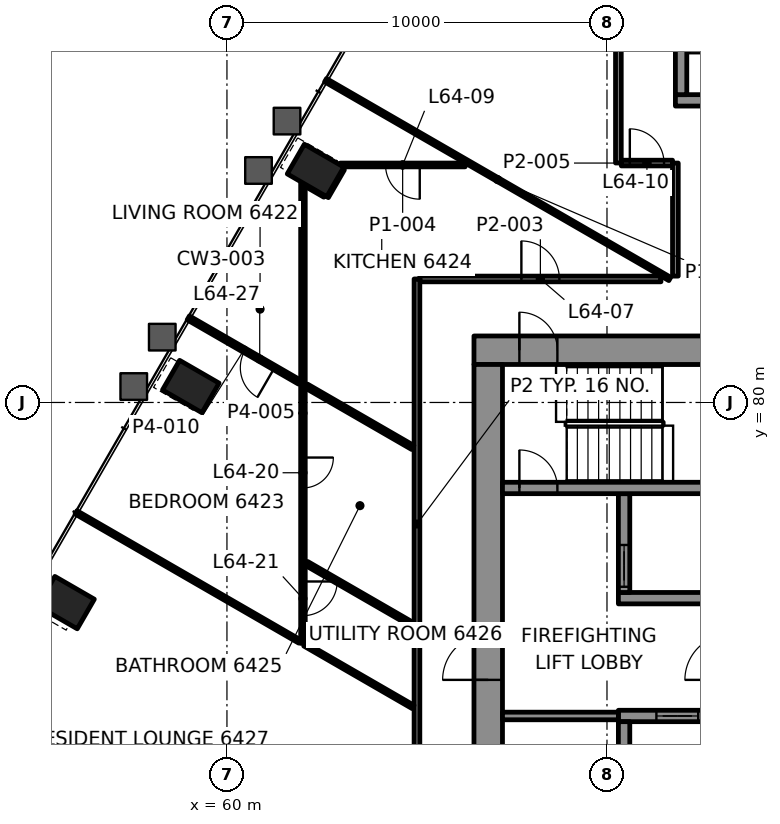
"""IFC4 building model, lengths in metres.
Left out: names, types, materials, properties, quantities, classifications, styles, units other than length and angle.
Written with IfcOpenShell. Run it as: python <this file> out.ifc"""

import sys

from ifc_helpers import new_model, si_unit, direction, frame, frame_2d, origin, origin_2d, place, context, subcontext, project, spatial, rectangle, hollow_rectangle, extrude, element, fill, save


model = new_model("IFC4")
c1 = context("Model", 3, precision=1e-05, world=origin(), true_north=direction((0.0, 1.0)))
c2 = subcontext(c1, "Body", "Model", "MODEL_VIEW")
j1 = project(units=[si_unit("LENGTHUNIT", "METRE"), si_unit("PLANEANGLEUNIT", "RADIAN")], contexts=[c1])
p1 = place(None, origin())
s1 = spatial("IfcSite", under=j1, at=p1, CompositionType="ELEMENT")
p2 = place(p1, origin())
s2 = spatial("IfcBuilding", under=s1, at=p2, CompositionType="ELEMENT")
p3 = place(p2, frame((0.0, 0.0, 270.6)))
s3 = spatial("IfcBuildingStorey", under=s2, at=p3, CompositionType="ELEMENT", Elevation=270.6)
for number, where, z_axis, x_axis in (
    (1, (62.332, 86.105, -0.0), (0.0, 0.0, 1.0), (-0.5, -0.866, 0.0)),
    (2, (59.049, 80.419, -0.0), (0.0, 0.0, 1.0), (-0.5, -0.866, 0.0)),
    (3, (55.766, 74.733, -0.0), (0.0, 0.0, 1.0), (-0.5, -0.866, 0.0)),
):
    element("IfcColumn", number, at=place(p3, frame(where, z_axis=z_axis, x_axis=x_axis)), inside=s3, PredefinedType="COLUMN", context=c2, shape_type="SweptSolid", body=[
        extrude(hollow_rectangle(XDim=0.9, YDim=1.2, WallThickness=0.06, at=origin_2d()), origin(), (0.0, 0.0, 1.0), 3.5),
    ])
p4 = place(p3, frame((66.5, 81.375, 0.0), z_axis=(0.0, 0.0, 1.0), x_axis=(1.0, 0.0, 0.0)))
e4 = element("IfcWall", 4, at=p4, inside=s3, PredefinedType="SHEAR", context=c2, shape_type="SweptSolid", body=[
    extrude(rectangle(XDim=17.0, YDim=0.75, at=frame_2d((8.5, 0.0))), origin(), (0.0, 0.0, 1.0), 3.3),
])
p5 = place(p4, frame((1.195, 0.0, 0.0)))
e5 = element("IfcOpeningElement", 5, at=p5, cuts=e4, PredefinedType="OPENING", context=c2, shape_type="SweptSolid", body=[
    extrude(rectangle(XDim=1.0, YDim=2.1, at=frame_2d((0.5, 1.05))), frame((0.0, 0.385, 0.0), z_axis=(0.0, -1.0, 0.0), x_axis=(1.0, 0.0, 0.0)), (0.0, 0.0, 1.0), 0.77),
])
p6 = place(p4, frame((15.005, 0.0, 0.0)))
e6 = element("IfcOpeningElement", 6, at=p6, cuts=e4, PredefinedType="OPENING", context=c2, shape_type="SweptSolid", body=[
    extrude(rectangle(XDim=1.0, YDim=2.1, at=frame_2d((0.5, 1.05))), frame((0.0, 0.385, 0.0), z_axis=(0.0, -1.0, 0.0), x_axis=(1.0, 0.0, 0.0)), (0.0, 0.0, 1.0), 0.77),
])
p7 = place(p4, frame((8.15, 0.0, 0.0)))
e7 = element("IfcOpeningElement", 7, at=p7, cuts=e4, PredefinedType="OPENING", context=c2, shape_type="SweptSolid", body=[
    extrude(rectangle(XDim=0.9, YDim=2.1, at=frame_2d((0.45, 1.05))), frame((0.0, 0.385, 0.0), z_axis=(0.0, -1.0, 0.0), x_axis=(1.0, 0.0, 0.0)), (0.0, 0.0, 1.0), 0.77),
])
p8 = place(p3, frame((66.875, 69.0, 0.0), z_axis=(0.0, 0.0, 1.0), x_axis=(0.0, 1.0, 0.0)))
e8 = element("IfcWall", 8, at=p8, inside=s3, PredefinedType="SHEAR", context=c2, shape_type="SweptSolid", body=[
    extrude(rectangle(XDim=12.0, YDim=0.75, at=frame_2d((6.0, 0.0))), origin(), (0.0, 0.0, 1.0), 3.3),
])
p9 = place(p8, frame((3.7, 0.0, 0.0)))
e9 = element("IfcOpeningElement", 9, at=p9, cuts=e8, PredefinedType="OPENING", context=c2, shape_type="SweptSolid", body=[
    extrude(rectangle(XDim=1.2, YDim=2.1, at=frame_2d((0.6, 1.05))), frame((0.0, 0.385, 0.0), z_axis=(0.0, -1.0, 0.0), x_axis=(1.0, 0.0, 0.0)), (0.0, 0.0, 1.0), 0.77),
])
p10 = place(p3, frame((70.3, 71.75, 0.0), z_axis=(0.0, 0.0, 1.0), x_axis=(1.0, 0.0, 0.0)))
e10 = element("IfcWall", 10, at=p10, inside=s3, PredefinedType="SHEAR", context=c2, shape_type="SweptSolid", body=[
    extrude(rectangle(XDim=11.5, YDim=0.3, at=frame_2d((5.75, 0.0))), origin(), (0.0, 0.0, 1.0), 3.3),
])
p11 = place(p10, frame((1.0, 0.0, 0.0)))
e11 = element("IfcOpeningElement", 11, at=p11, cuts=e10, PredefinedType="OPENING", context=c2, shape_type="SweptSolid", body=[
    extrude(rectangle(XDim=1.1, YDim=2.1, at=frame_2d((0.55, 1.05))), frame((0.0, 0.16, 0.0), z_axis=(0.0, -1.0, 0.0), x_axis=(1.0, 0.0, 0.0)), (0.0, 0.0, 1.0), 0.32),
])
p12 = place(p10, frame((3.8, 0.0, 0.0)))
e12 = element("IfcOpeningElement", 12, at=p12, cuts=e10, PredefinedType="OPENING", context=c2, shape_type="SweptSolid", body=[
    extrude(rectangle(XDim=1.1, YDim=2.1, at=frame_2d((0.55, 1.05))), frame((0.0, 0.16, 0.0), z_axis=(0.0, -1.0, 0.0), x_axis=(1.0, 0.0, 0.0)), (0.0, 0.0, 1.0), 0.32),
])
p13 = place(p10, frame((6.6, 0.0, 0.0)))
e13 = element("IfcOpeningElement", 13, at=p13, cuts=e10, PredefinedType="OPENING", context=c2, shape_type="SweptSolid", body=[
    extrude(rectangle(XDim=1.1, YDim=2.1, at=frame_2d((0.55, 1.05))), frame((0.0, 0.16, 0.0), z_axis=(0.0, -1.0, 0.0), x_axis=(1.0, 0.0, 0.0)), (0.0, 0.0, 1.0), 0.32),
])
p14 = place(p10, frame((9.4, 0.0, 0.0)))
e14 = element("IfcOpeningElement", 14, at=p14, cuts=e10, PredefinedType="OPENING", context=c2, shape_type="SweptSolid", body=[
    extrude(rectangle(XDim=1.1, YDim=2.1, at=frame_2d((0.55, 1.05))), frame((0.0, 0.16, 0.0), z_axis=(0.0, -1.0, 0.0), x_axis=(1.0, 0.0, 0.0)), (0.0, 0.0, 1.0), 0.32),
])
p15 = place(p3, frame((70.3, 74.85, 0.0), z_axis=(0.0, 0.0, 1.0), x_axis=(1.0, 0.0, 0.0)))
e15 = element("IfcWall", 15, at=p15, inside=s3, PredefinedType="SHEAR", context=c2, shape_type="SweptSolid", body=[
    extrude(rectangle(XDim=5.9, YDim=0.3, at=frame_2d((2.95, 0.0))), origin(), (0.0, 0.0, 1.0), 3.3),
])
p16 = place(p15, frame((3.8, 0.0, 0.0)))
e16 = element("IfcOpeningElement", 16, at=p16, cuts=e15, PredefinedType="OPENING", context=c2, shape_type="SweptSolid", body=[
    extrude(rectangle(XDim=1.1, YDim=2.1, at=frame_2d((0.55, 1.05))), frame((0.0, 0.16, 0.0), z_axis=(0.0, -1.0, 0.0), x_axis=(1.0, 0.0, 0.0)), (0.0, 0.0, 1.0), 0.32),
])
p17 = place(p3, frame((70.45, 69.0, 0.0), z_axis=(0.0, 0.0, 1.0), x_axis=(0.0, 1.0, 0.0)))
e17 = element("IfcWall", 17, at=p17, inside=s3, PredefinedType="SHEAR", context=c2, shape_type="SweptSolid", body=[
    extrude(rectangle(XDim=2.6, YDim=0.3, at=frame_2d((1.3, 0.0))), origin(), (0.0, 0.0, 1.0), 3.3),
])
p18 = place(p3, frame((70.45, 75.0, 0.0), z_axis=(0.0, 0.0, 1.0), x_axis=(0.0, 1.0, 0.0)))
e18 = element("IfcWall", 18, at=p18, inside=s3, PredefinedType="SHEAR", context=c2, shape_type="SweptSolid", body=[
    extrude(rectangle(XDim=2.6, YDim=0.3, at=frame_2d((1.3, 0.0))), origin(), (0.0, 0.0, 1.0), 3.3),
])
p19 = place(p18, frame((0.15, 0.0, 0.0)))
e19 = element("IfcOpeningElement", 19, at=p19, cuts=e18, PredefinedType="OPENING", context=c2, shape_type="SweptSolid", body=[
    extrude(rectangle(XDim=1.1, YDim=2.1, at=frame_2d((0.55, 1.05))), frame((0.0, 0.16, 0.0), z_axis=(0.0, -1.0, 0.0), x_axis=(1.0, 0.0, 0.0)), (0.0, 0.0, 1.0), 0.32),
])
p20 = place(p3, frame((67.25, 77.75, 0.0), z_axis=(0.0, 0.0, 1.0), x_axis=(1.0, 0.0, 0.0)))
e20 = element("IfcWall", 20, at=p20, inside=s3, PredefinedType="SHEAR", context=c2, shape_type="SweptSolid", body=[
    extrude(rectangle(XDim=15.5, YDim=0.3, at=frame_2d((7.75, 0.0))), origin(), (0.0, 0.0, 1.0), 3.3),
])
p21 = place(p20, frame((0.445, 0.0, 0.0)))
e21 = element("IfcOpeningElement", 21, at=p21, cuts=e20, PredefinedType="OPENING", context=c2, shape_type="SweptSolid", body=[
    extrude(rectangle(XDim=1.0, YDim=2.1, at=frame_2d((0.5, 1.05))), frame((0.0, 0.16, 0.0), z_axis=(0.0, -1.0, 0.0), x_axis=(1.0, 0.0, 0.0)), (0.0, 0.0, 1.0), 0.32),
])
p22 = place(p3, frame((71.8, 87.95, 0.0), z_axis=(0.0, 0.0, 1.0), x_axis=(1.0, 0.0, 0.0)))
e22 = element("IfcWall", 22, at=p22, inside=s3, PredefinedType="SHEAR", context=c2, shape_type="SweptSolid", body=[
    extrude(rectangle(XDim=6.4, YDim=0.3, at=frame_2d((3.2, 0.0))), origin(), (0.0, 0.0, 1.0), 3.3),
])
p23 = place(p22, frame((1.325, 0.0, 0.0)))
e23 = element("IfcOpeningElement", 23, at=p23, cuts=e22, PredefinedType="OPENING", context=c2, shape_type="SweptSolid", body=[
    extrude(rectangle(XDim=1.0, YDim=2.1, at=frame_2d((0.5, 1.05))), frame((0.0, 0.16, 0.0), z_axis=(0.0, -1.0, 0.0), x_axis=(1.0, 0.0, 0.0)), (0.0, 0.0, 1.0), 0.32),
])
p24 = place(p22, frame((4.125, 0.0, 0.0)))
e24 = element("IfcOpeningElement", 24, at=p24, cuts=e22, PredefinedType="OPENING", context=c2, shape_type="SweptSolid", body=[
    extrude(rectangle(XDim=1.2, YDim=2.1, at=frame_2d((0.6, 1.05))), frame((0.0, 0.16, 0.0), z_axis=(0.0, -1.0, 0.0), x_axis=(1.0, 0.0, 0.0)), (0.0, 0.0, 1.0), 0.32),
])
p25 = place(p3, frame((71.95, 88.1, 0.0), z_axis=(0.0, 0.0, 1.0), x_axis=(0.0, 1.0, 0.0)))
e25 = element("IfcWall", 25, at=p25, inside=s3, PredefinedType="SHEAR", context=c2, shape_type="SweptSolid", body=[
    extrude(rectangle(XDim=6.2, YDim=0.3, at=frame_2d((3.1, 0.0))), origin(), (0.0, 0.0, 1.0), 3.3),
])
p26 = place(p3, frame((65.075, 83.25, 0.0), z_axis=(0.0, 0.0, 1.0), x_axis=(1.0, 0.0, 0.0)))
e26 = element("IfcWall", 26, at=p26, inside=s3, PredefinedType="PARTITIONING", context=c2, shape_type="SweptSolid", body=[
    extrude(rectangle(XDim=6.345, YDim=0.15, at=frame_2d((3.172, 0.0))), origin(), (0.0, 0.0, 1.0), 2.7),
])
p27 = place(p26, frame((2.672, 0.0, 0.0)))
e27 = element("IfcOpeningElement", 27, at=p27, cuts=e26, PredefinedType="OPENING", context=c2, shape_type="SweptSolid", body=[
    extrude(rectangle(XDim=1.0, YDim=2.1, at=frame_2d((0.5, 1.05))), frame((0.0, 0.085, 0.0), z_axis=(0.0, -1.0, 0.0), x_axis=(1.0, 0.0, 0.0)), (0.0, 0.0, 1.0), 0.17),
])
p28 = place(p3, frame((66.267, 86.25, 0.0), z_axis=(0.0, 0.0, 1.0), x_axis=(-1.0, 0.0, 0.0)))
e28 = element("IfcWall", 28, at=p28, inside=s3, PredefinedType="PARTITIONING", context=c2, shape_type="SweptSolid", body=[
    extrude(rectangle(XDim=3.287, YDim=0.1, at=frame_2d((1.644, 0.0))), origin(), (0.0, 0.0, 1.0), 2.7),
])
p29 = place(p28, frame((1.193, 0.0, 0.0)))
e29 = element("IfcOpeningElement", 29, at=p29, cuts=e28, PredefinedType="OPENING", context=c2, shape_type="SweptSolid", body=[
    extrude(rectangle(XDim=0.9, YDim=2.1, at=frame_2d((0.45, 1.05))), frame((0.0, 0.06, 0.0), z_axis=(0.0, -1.0, 0.0), x_axis=(1.0, 0.0, 0.0)), (0.0, 0.0, 1.0), 0.12),
])
p30 = place(p3, frame((70.377, 86.3, 0.0), z_axis=(0.0, 0.0, 1.0), x_axis=(1.0, 0.0, 0.0)))
e30 = element("IfcWall", 30, at=p30, inside=s3, PredefinedType="PARTITIONING", context=c2, shape_type="SweptSolid", body=[
    extrude(rectangle(XDim=1.348, YDim=0.15, at=frame_2d((0.674, 0.0))), origin(), (0.0, 0.0, 1.0), 2.7),
])
p31 = place(p30, frame((0.224, 0.0, 0.0)))
e31 = element("IfcOpeningElement", 31, at=p31, cuts=e30, PredefinedType="OPENING", context=c2, shape_type="SweptSolid", body=[
    extrude(rectangle(XDim=0.9, YDim=2.1, at=frame_2d((0.45, 1.05))), frame((0.0, 0.085, 0.0), z_axis=(0.0, -1.0, 0.0), x_axis=(1.0, 0.0, 0.0)), (0.0, 0.0, 1.0), 0.17),
])
p32 = place(p3, frame((62.626, 85.415, 0.0), z_axis=(0.0, 0.0, 1.0), x_axis=(0.499973348067, 0.866040790738, 0.0)))
e32 = element("IfcWall", 32, at=p32, inside=s3, PredefinedType="PARTITIONING", context=c2, shape_type="SweptSolid", body=[
    extrude(rectangle(XDim=0.842, YDim=0.1, at=frame_2d((0.421, 0.0))), origin(), (0.0, 0.0, 1.0), 2.7),
])
p33 = place(p3, frame((71.8, 83.325, 0.0), z_axis=(0.0, 0.0, 1.0), x_axis=(0.0, 1.0, 0.0)))
e33 = element("IfcWall", 33, at=p33, inside=s3, PredefinedType="PARTITIONING", context=c2, shape_type="SweptSolid", body=[
    extrude(rectangle(XDim=2.975, YDim=0.15, at=frame_2d((1.488, 0.0))), origin(), (0.0, 0.0, 1.0), 2.697),
])
p34 = place(p3, frame((70.3, 86.302, 0.0), z_axis=(0.0, 0.0, 1.0), x_axis=(0.0, 1.0, 0.0)))
e34 = element("IfcWall", 34, at=p34, inside=s3, PredefinedType="PARTITIONING", context=c2, shape_type="SweptSolid", body=[
    extrude(rectangle(XDim=9.796, YDim=0.15, at=frame_2d((4.898, 0.0))), origin(), (0.0, 0.0, 1.0), 2.7),
])
p35 = place(p3, frame((65.0, 70.352, 0.0), z_axis=(0.0, 0.0, 1.0), x_axis=(0.0, 1.0, 0.0)))
e35 = element("IfcWall", 35, at=p35, inside=s3, PredefinedType="PARTITIONING", context=c2, shape_type="SweptSolid", body=[
    extrude(rectangle(XDim=12.898, YDim=0.15, at=frame_2d((6.449, 0.0))), origin(), (0.0, 0.0, 1.0), 2.7),
])
p36 = place(p3, frame((62.0, 85.776, 0.0), z_axis=(0.0, 0.0, 1.0), x_axis=(0.0, -1.0, 0.0)))
e36 = element("IfcWall", 36, at=p36, inside=s3, PredefinedType="PARTITIONING", context=c2, shape_type="SweptSolid", body=[
    extrude(rectangle(XDim=12.115, YDim=0.12, at=frame_2d((6.058, 0.0))), origin(), (0.0, 0.0, 1.0), 2.688),
])
p37 = place(p36, frame((7.226, 0.0, 0.0)))
e37 = element("IfcOpeningElement", 37, at=p37, cuts=e36, PredefinedType="OPENING", context=c2, shape_type="SweptSolid", body=[
    extrude(rectangle(XDim=0.8, YDim=2.1, at=frame_2d((0.4, 1.05))), frame((0.0, 0.07, 0.0), z_axis=(0.0, -1.0, 0.0), x_axis=(1.0, 0.0, 0.0)), (0.0, 0.0, 1.0), 0.14),
])
p38 = place(p36, frame((10.487, 0.0, 0.0)))
e38 = element("IfcOpeningElement", 38, at=p38, cuts=e36, PredefinedType="OPENING", context=c2, shape_type="SweptSolid", body=[
    extrude(rectangle(XDim=0.9, YDim=2.1, at=frame_2d((0.45, 1.05))), frame((0.0, 0.07, 0.0), z_axis=(0.0, -1.0, 0.0), x_axis=(1.0, 0.0, 0.0)), (0.0, 0.0, 1.0), 0.14),
])
p39 = place(p3, frame((71.653, 83.25, 0.0), z_axis=(0.0, 0.0, 1.0), x_axis=(-0.866025448133, 0.499999923186, 0.0)))
e39 = element("IfcWall", 39, at=p39, inside=s3, PredefinedType="PARTITIONING", context=c2, shape_type="SweptSolid", body=[
    extrude(rectangle(XDim=10.46, YDim=0.1, at=frame_2d((5.23, 0.0))), origin(), (0.0, 0.0, 1.0), 2.688),
])
p40 = place(p3, frame((62.574, 85.445, 0.0), z_axis=(0.0, 0.0, 1.0), x_axis=(-0.866048512801, 0.499959971872, 0.0)))
e40 = element("IfcWall", 40, at=p40, inside=s3, PredefinedType="PARTITIONING", context=c2, shape_type="SweptSolid", body=[
    extrude(rectangle(XDim=0.563, YDim=0.1, at=frame_2d((0.282, 0.0))), origin(), (0.0, 0.0, 1.0), 2.688),
])
p41 = place(p3, frame((64.89, 78.815, 0.0), z_axis=(0.0, 0.0, 1.0), x_axis=(-0.866032190624, 0.499988244665, 0.0)))
e41 = element("IfcWall", 41, at=p41, inside=s3, PredefinedType="PARTITIONING", context=c2, shape_type="SweptSolid", body=[
    extrude(rectangle(XDim=3.233, YDim=0.12, at=frame_2d((1.617, 0.0))), origin(), (0.0, 0.0, 1.0), 2.7),
])
p42 = place(p3, frame((64.891, 74.149, 0.0), z_axis=(0.0, 0.0, 1.0), x_axis=(-0.866019355129, 0.500010476433, 0.0)))
e42 = element("IfcWall", 42, at=p42, inside=s3, PredefinedType="PARTITIONING", context=c2, shape_type="SweptSolid", body=[
    extrude(rectangle(XDim=3.229, YDim=0.12, at=frame_2d((1.614, 0.0))), origin(), (0.0, 0.0, 1.0), 2.7),
])
p43 = place(p3, frame((64.899, 71.987, 0.0), z_axis=(0.0, 0.0, 1.0), x_axis=(-0.866032610133, 0.499987518031, 0.0)))
e43 = element("IfcWall", 43, at=p43, inside=s3, PredefinedType="PARTITIONING", context=c2, shape_type="SweptSolid", body=[
    extrude(rectangle(XDim=3.295, YDim=0.1, at=frame_2d((1.648, 0.0))), origin(), (0.0, 0.0, 1.0), 2.7),
])
p44 = place(p3, frame((61.91, 80.536, 0.0), z_axis=(0.0, 0.0, 1.0), x_axis=(-0.866002725405, 0.500039278049, 0.0)))
e44 = element("IfcWall", 44, at=p44, inside=s3, PredefinedType="PARTITIONING", context=c2, shape_type="SweptSolid", body=[
    extrude(rectangle(XDim=3.38, YDim=0.12, at=frame_2d((1.69, 0.0))), origin(), (0.0, 0.0, 1.0), 2.688),
])
p45 = place(p44, frame((0.76, 0.0, 0.0)))
e45 = element("IfcOpeningElement", 45, at=p45, cuts=e44, PredefinedType="OPENING", context=c2, shape_type="SweptSolid", body=[
    extrude(rectangle(XDim=0.9, YDim=2.1, at=frame_2d((0.45, 1.05))), frame((0.0, 0.07, 0.0), z_axis=(0.0, -1.0, 0.0), x_axis=(1.0, 0.0, 0.0)), (0.0, 0.0, 1.0), 0.14),
])
p46 = place(p3, frame((61.915, 73.71, 0.0), z_axis=(0.0, 0.0, 1.0), x_axis=(-0.866024081565, 0.500002290144, 0.0)))
e46 = element("IfcWall", 46, at=p46, inside=s3, PredefinedType="PARTITIONING", context=c2, shape_type="SweptSolid", body=[
    extrude(rectangle(XDim=6.797, YDim=0.1, at=frame_2d((3.398, 0.0))), origin(), (0.0, 0.0, 1.0), 2.688),
])
p47 = place(p3, frame((67.25, 71.75, 0.0), z_axis=(0.0, 0.0, 1.0), x_axis=(1.0, 0.0, 0.0)))
e47 = element("IfcWall", 47, at=p47, inside=s3, PredefinedType="PARTITIONING", context=c2, shape_type="SweptSolid", body=[
    extrude(rectangle(XDim=3.05, YDim=0.2, at=frame_2d((1.525, 0.0))), origin(), (0.0, 0.0, 1.0), 3.3),
])
p48 = place(p27, origin())
e48 = element("IfcDoor", 48, at=p48, inside=s3, OperationType="SINGLE_SWING_RIGHT", PredefinedType="DOOR", context=c2, shape_type="SweptSolid", body=[
    extrude(rectangle(XDim=1.0, YDim=2.1, at=frame_2d((0.5, 1.05))), frame((0.0, 0.025, 0.0), z_axis=(0.0, -1.0, 0.0), x_axis=(1.0, 0.0, 0.0)), (0.0, 0.0, 1.0), 0.05),
])
fill(e27, e48)
p49 = place(p29, origin())
e49 = element("IfcDoor", 49, at=p49, inside=s3, OperationType="SINGLE_SWING_RIGHT", PredefinedType="DOOR", context=c2, shape_type="SweptSolid", body=[
    extrude(rectangle(XDim=0.9, YDim=2.1, at=frame_2d((0.45, 1.05))), frame((0.0, 0.025, 0.0), z_axis=(0.0, -1.0, 0.0), x_axis=(1.0, 0.0, 0.0)), (0.0, 0.0, 1.0), 0.05),
])
fill(e29, e49)
p50 = place(p31, origin())
e50 = element("IfcDoor", 50, at=p50, inside=s3, OperationType="SINGLE_SWING_RIGHT", PredefinedType="DOOR", context=c2, shape_type="SweptSolid", body=[
    extrude(rectangle(XDim=0.9, YDim=2.1, at=frame_2d((0.45, 1.05))), frame((0.0, 0.025, 0.0), z_axis=(0.0, -1.0, 0.0), x_axis=(1.0, 0.0, 0.0)), (0.0, 0.0, 1.0), 0.05),
])
fill(e31, e50)
p51 = place(p37, origin())
e51 = element("IfcDoor", 51, at=p51, inside=s3, OperationType="SINGLE_SWING_RIGHT", PredefinedType="DOOR", context=c2, shape_type="SweptSolid", body=[
    extrude(rectangle(XDim=0.8, YDim=2.1, at=frame_2d((0.4, 1.05))), frame((0.0, 0.025, 0.0), z_axis=(0.0, -1.0, 0.0), x_axis=(1.0, 0.0, 0.0)), (0.0, 0.0, 1.0), 0.05),
])
fill(e37, e51)
p52 = place(p38, origin())
e52 = element("IfcDoor", 52, at=p52, inside=s3, OperationType="SINGLE_SWING_LEFT", PredefinedType="DOOR", context=c2, shape_type="SweptSolid", body=[
    extrude(rectangle(XDim=0.9, YDim=2.1, at=frame_2d((0.45, 1.05))), frame((0.0, 0.025, 0.0), z_axis=(0.0, -1.0, 0.0), x_axis=(1.0, 0.0, 0.0)), (0.0, 0.0, 1.0), 0.05),
])
fill(e38, e52)
p53 = place(p45, origin())
e53 = element("IfcDoor", 53, at=p53, inside=s3, OperationType="SINGLE_SWING_LEFT", PredefinedType="DOOR", context=c2, shape_type="SweptSolid", body=[
    extrude(rectangle(XDim=0.9, YDim=2.1, at=frame_2d((0.45, 1.05))), frame((0.0, 0.025, 0.0), z_axis=(0.0, -1.0, 0.0), x_axis=(1.0, 0.0, 0.0)), (0.0, 0.0, 1.0), 0.05),
])
fill(e45, e53)
p54 = place(p11, origin())
e54 = element("IfcDoor", 54, at=p54, inside=s3, OperationType="DOUBLE_DOOR_SLIDING", PredefinedType="DOOR", context=c2, shape_type="SweptSolid", body=[
    extrude(rectangle(XDim=1.1, YDim=2.1, at=frame_2d((0.55, 1.05))), frame((0.0, 0.025, 0.0), z_axis=(0.0, -1.0, 0.0), x_axis=(1.0, 0.0, 0.0)), (0.0, 0.0, 1.0), 0.05),
])
fill(e11, e54)
p55 = place(p19, origin())
e55 = element("IfcDoor", 55, at=p55, inside=s3, OperationType="DOUBLE_DOOR_SLIDING", PredefinedType="DOOR", context=c2, shape_type="SweptSolid", body=[
    extrude(rectangle(XDim=1.1, YDim=2.1, at=frame_2d((0.55, 1.05))), frame((0.0, 0.025, 0.0), z_axis=(0.0, -1.0, 0.0), x_axis=(1.0, 0.0, 0.0)), (0.0, 0.0, 1.0), 0.05),
])
fill(e19, e55)
p56 = place(p21, origin())
e56 = element("IfcDoor", 56, at=p56, inside=s3, OperationType="SINGLE_SWING_LEFT", PredefinedType="DOOR", context=c2, shape_type="SweptSolid", body=[
    extrude(rectangle(XDim=1.0, YDim=2.1, at=frame_2d((0.5, 1.05))), frame((0.0, 0.025, 0.0), z_axis=(0.0, -1.0, 0.0), x_axis=(1.0, 0.0, 0.0)), (0.0, 0.0, 1.0), 0.05),
])
fill(e21, e56)
p57 = place(p5, origin())
e57 = element("IfcDoor", 57, at=p57, inside=s3, OperationType="SINGLE_SWING_RIGHT", PredefinedType="DOOR", context=c2, shape_type="SweptSolid", body=[
    extrude(rectangle(XDim=1.0, YDim=2.1, at=frame_2d((0.5, 1.05))), frame((0.0, 0.095, 0.0), z_axis=(0.0, -1.0, 0.0), x_axis=(1.0, 0.0, 0.0)), (0.0, 0.0, 1.0), 0.19),
])
fill(e5, e57)
p58 = place(p9, origin())
e58 = element("IfcDoor", 58, at=p58, inside=s3, OperationType="SINGLE_SWING_RIGHT", PredefinedType="DOOR", context=c2, shape_type="SweptSolid", body=[
    extrude(rectangle(XDim=1.2, YDim=2.1, at=frame_2d((0.6, 1.05))), frame((0.0, 0.095, 0.0), z_axis=(0.0, -1.0, 0.0), x_axis=(1.0, 0.0, 0.0)), (0.0, 0.0, 1.0), 0.19),
])
fill(e9, e58)
save(model, sys.argv[1])
